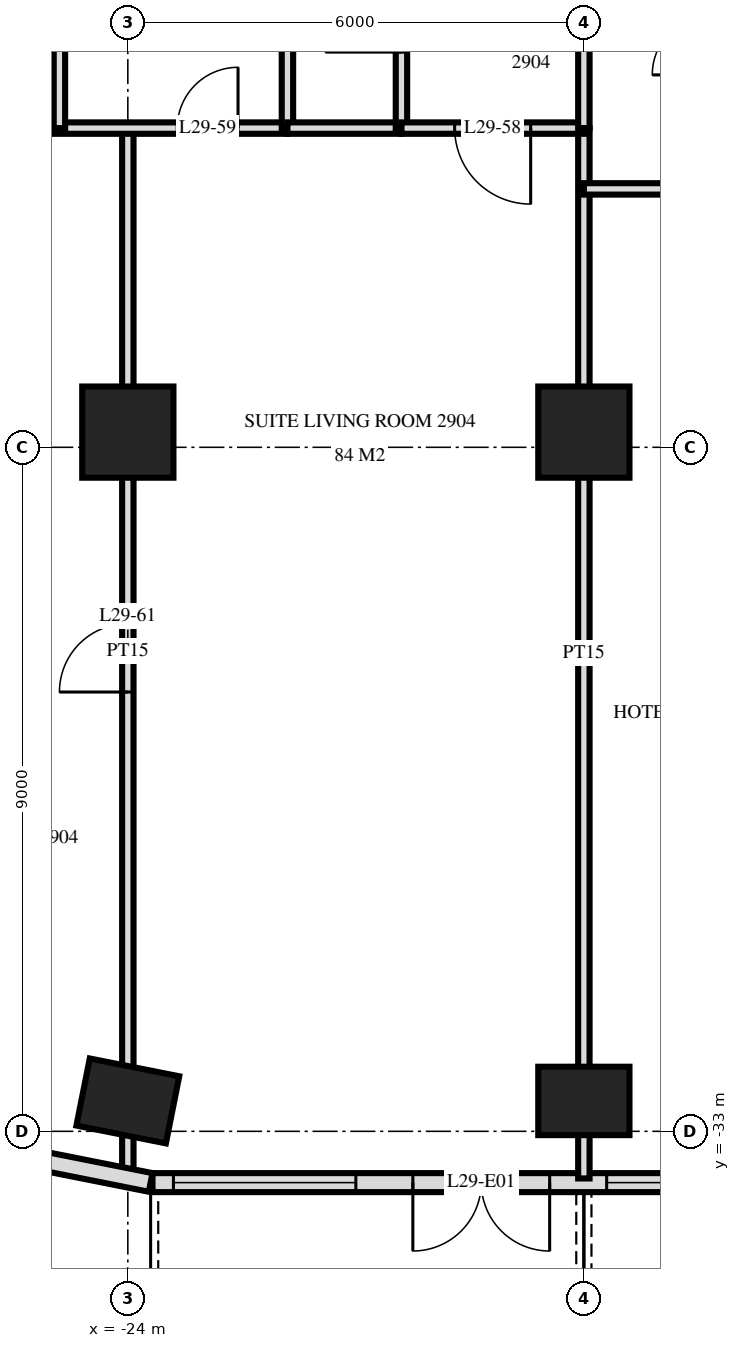
"""IFC4 building model, lengths in metres.
Left out: names, types, materials, properties, quantities, classifications, styles, units other than length and angle.
Written with IfcOpenShell. Run it as: python <this file> out.ifc"""

import sys

from ifc_helpers import new_model, si_unit, direction, frame, frame_2d, origin, origin_2d, place, context, subcontext, project, spatial, rectangle, extrude, element, fill, save


model = new_model("IFC4")
c1 = context("Model", 3, precision=1e-05, world=origin(), true_north=direction((0.0, 1.0)))
c2 = subcontext(c1, "Body", "Model", "MODEL_VIEW")
j1 = project(units=[si_unit("LENGTHUNIT", "METRE"), si_unit("PLANEANGLEUNIT", "RADIAN")], contexts=[c1])
p1 = place(None, origin())
s1 = spatial("IfcSite", under=j1, at=p1, CompositionType="ELEMENT")
p2 = place(p1, origin())
s2 = spatial("IfcBuilding", under=s1, at=p2, CompositionType="ELEMENT")
p3 = place(p2, frame((0.0, 0.0, 116.4)))
s3 = spatial("IfcBuildingStorey", under=s2, at=p3, CompositionType="ELEMENT", Elevation=116.4)
p4 = place(p3, frame((-24.0, -32.6, 0.0), z_axis=(0.0, 0.0, 1.0), x_axis=(-0.980792089743, 0.195056086032, 0.0)))
e1 = element("IfcColumn", 1, at=p4, inside=s3, PredefinedType="COLUMN", context=c2, shape_type="SweptSolid", body=[
    extrude(rectangle(XDim=1.2, YDim=0.9, at=origin_2d()), origin(), (0.0, 0.0, 1.0), 3.6),
])
p5 = place(p3, frame((-24.0, -23.8, 0.0), z_axis=(0.0, 0.0, 1.0), x_axis=(1.0, 0.0, 0.0)))
e2 = element("IfcColumn", 2, at=p5, inside=s3, PredefinedType="COLUMN", context=c2, shape_type="SweptSolid", body=[
    extrude(rectangle(XDim=1.2, YDim=1.2, at=origin_2d()), origin(), (0.0, 0.0, 1.0), 3.6),
])
p6 = place(p3, frame((-18.0, -32.6, 0.0), z_axis=(0.0, 0.0, 1.0), x_axis=(1.0, 0.0, 0.0)))
e3 = element("IfcColumn", 3, at=p6, inside=s3, PredefinedType="COLUMN", context=c2, shape_type="SweptSolid", body=[
    extrude(rectangle(XDim=1.2, YDim=0.9, at=origin_2d()), origin(), (0.0, 0.0, 1.0), 3.6),
])
p7 = place(p3, frame((-18.0, -23.8, 0.0), z_axis=(0.0, 0.0, 1.0), x_axis=(1.0, 0.0, 0.0)))
e4 = element("IfcColumn", 4, at=p7, inside=s3, PredefinedType="COLUMN", context=c2, shape_type="SweptSolid", body=[
    extrude(rectangle(XDim=1.2, YDim=1.2, at=origin_2d()), origin(), (0.0, 0.0, 1.0), 3.6),
])
p8 = place(p3, frame((-25.349, -33.344, 0.0), z_axis=(0.0, 0.0, 1.0), x_axis=(0.980775640221, -0.19513878023, 0.0)))
e5 = element("IfcWall", 5, at=p8, inside=s3, PredefinedType="SOLIDWALL", context=c2, shape_type="SweptSolid", body=[
    extrude(rectangle(XDim=1.681, YDim=0.25, at=frame_2d((0.841, 0.0))), origin(), (0.0, 0.0, 1.0), 3.32),
])
p9 = place(p3, frame((-23.675, -33.675, 0.0), z_axis=(0.0, 0.0, 1.0), x_axis=(1.0, 0.0, 0.0)))
e6 = element("IfcWall", 6, at=p9, inside=s3, PredefinedType="SOLIDWALL", context=c2, shape_type="SweptSolid", body=[
    extrude(rectangle(XDim=47.351, YDim=0.25, at=frame_2d((23.675, 0.0))), origin(), (0.0, 0.0, 1.0), 3.32),
])
p10 = place(p9, frame((0.275, 0.0, 0.3)))
e7 = element("IfcOpeningElement", 7, at=p10, cuts=e6, PredefinedType="OPENING", context=c2, shape_type="SweptSolid", body=[
    extrude(rectangle(XDim=2.4, YDim=2.1, at=frame_2d((1.2, 1.05))), frame((0.0, 0.135, 0.0), z_axis=(0.0, -1.0, 0.0), x_axis=(1.0, 0.0, 0.0)), (0.0, 0.0, 1.0), 0.27),
])
p11 = place(p9, frame((3.425, 0.0, 0.0)))
e8 = element("IfcOpeningElement", 8, at=p11, cuts=e6, PredefinedType="OPENING", context=c2, shape_type="SweptSolid", body=[
    extrude(rectangle(XDim=1.8, YDim=2.4, at=frame_2d((0.9, 1.2))), frame((0.0, 0.135, 0.0), z_axis=(0.0, -1.0, 0.0), x_axis=(1.0, 0.0, 0.0)), (0.0, 0.0, 1.0), 0.27),
])
p12 = place(p9, frame((5.975, 0.0, 0.3)))
e9 = element("IfcOpeningElement", 9, at=p12, cuts=e6, PredefinedType="OPENING", context=c2, shape_type="SweptSolid", body=[
    extrude(rectangle(XDim=2.4, YDim=2.1, at=frame_2d((1.2, 1.05))), frame((0.0, 0.135, 0.0), z_axis=(0.0, -1.0, 0.0), x_axis=(1.0, 0.0, 0.0)), (0.0, 0.0, 1.0), 0.27),
])
p13 = place(p9, frame((9.275, 0.0, 0.0)))
e10 = element("IfcOpeningElement", 10, at=p13, cuts=e6, PredefinedType="OPENING", context=c2, shape_type="SweptSolid", body=[
    extrude(rectangle(XDim=1.8, YDim=2.4, at=frame_2d((0.9, 1.2))), frame((0.0, 0.135, 0.0), z_axis=(0.0, -1.0, 0.0), x_axis=(1.0, 0.0, 0.0)), (0.0, 0.0, 1.0), 0.27),
])
p14 = place(p9, frame((12.275, 0.0, 0.0)))
e11 = element("IfcOpeningElement", 11, at=p14, cuts=e6, PredefinedType="OPENING", context=c2, shape_type="SweptSolid", body=[
    extrude(rectangle(XDim=1.8, YDim=2.4, at=frame_2d((0.9, 1.2))), frame((0.0, 0.135, 0.0), z_axis=(0.0, -1.0, 0.0), x_axis=(1.0, 0.0, 0.0)), (0.0, 0.0, 1.0), 0.27),
])
p15 = place(p9, frame((14.975, 0.0, 0.3)))
e12 = element("IfcOpeningElement", 12, at=p15, cuts=e6, PredefinedType="OPENING", context=c2, shape_type="SweptSolid", body=[
    extrude(rectangle(XDim=2.4, YDim=2.1, at=frame_2d((1.2, 1.05))), frame((0.0, 0.135, 0.0), z_axis=(0.0, -1.0, 0.0), x_axis=(1.0, 0.0, 0.0)), (0.0, 0.0, 1.0), 0.27),
])
p16 = place(p9, frame((17.975, 0.0, 0.3)))
e13 = element("IfcOpeningElement", 13, at=p16, cuts=e6, PredefinedType="OPENING", context=c2, shape_type="SweptSolid", body=[
    extrude(rectangle(XDim=2.4, YDim=2.1, at=frame_2d((1.2, 1.05))), frame((0.0, 0.135, 0.0), z_axis=(0.0, -1.0, 0.0), x_axis=(1.0, 0.0, 0.0)), (0.0, 0.0, 1.0), 0.27),
])
p17 = place(p9, frame((21.275, 0.0, 0.0)))
e14 = element("IfcOpeningElement", 14, at=p17, cuts=e6, PredefinedType="OPENING", context=c2, shape_type="SweptSolid", body=[
    extrude(rectangle(XDim=1.8, YDim=2.4, at=frame_2d((0.9, 1.2))), frame((0.0, 0.135, 0.0), z_axis=(0.0, -1.0, 0.0), x_axis=(1.0, 0.0, 0.0)), (0.0, 0.0, 1.0), 0.27),
])
p18 = place(p9, frame((24.275, 0.0, 0.0)))
e15 = element("IfcOpeningElement", 15, at=p18, cuts=e6, PredefinedType="OPENING", context=c2, shape_type="SweptSolid", body=[
    extrude(rectangle(XDim=1.8, YDim=2.4, at=frame_2d((0.9, 1.2))), frame((0.0, 0.135, 0.0), z_axis=(0.0, -1.0, 0.0), x_axis=(1.0, 0.0, 0.0)), (0.0, 0.0, 1.0), 0.27),
])
p19 = place(p9, frame((26.975, 0.0, 0.3)))
e16 = element("IfcOpeningElement", 16, at=p19, cuts=e6, PredefinedType="OPENING", context=c2, shape_type="SweptSolid", body=[
    extrude(rectangle(XDim=2.4, YDim=2.1, at=frame_2d((1.2, 1.05))), frame((0.0, 0.135, 0.0), z_axis=(0.0, -1.0, 0.0), x_axis=(1.0, 0.0, 0.0)), (0.0, 0.0, 1.0), 0.27),
])
p20 = place(p9, frame((30.275, 0.0, 0.0)))
e17 = element("IfcOpeningElement", 17, at=p20, cuts=e6, PredefinedType="OPENING", context=c2, shape_type="SweptSolid", body=[
    extrude(rectangle(XDim=1.8, YDim=2.4, at=frame_2d((0.9, 1.2))), frame((0.0, 0.135, 0.0), z_axis=(0.0, -1.0, 0.0), x_axis=(1.0, 0.0, 0.0)), (0.0, 0.0, 1.0), 0.27),
])
p21 = place(p9, frame((32.975, 0.0, 0.3)))
e18 = element("IfcOpeningElement", 18, at=p21, cuts=e6, PredefinedType="OPENING", context=c2, shape_type="SweptSolid", body=[
    extrude(rectangle(XDim=2.4, YDim=2.1, at=frame_2d((1.2, 1.05))), frame((0.0, 0.135, 0.0), z_axis=(0.0, -1.0, 0.0), x_axis=(1.0, 0.0, 0.0)), (0.0, 0.0, 1.0), 0.27),
])
p22 = place(p9, frame((35.975, 0.0, 0.3)))
e19 = element("IfcOpeningElement", 19, at=p22, cuts=e6, PredefinedType="OPENING", context=c2, shape_type="SweptSolid", body=[
    extrude(rectangle(XDim=2.4, YDim=2.1, at=frame_2d((1.2, 1.05))), frame((0.0, 0.135, 0.0), z_axis=(0.0, -1.0, 0.0), x_axis=(1.0, 0.0, 0.0)), (0.0, 0.0, 1.0), 0.27),
])
p23 = place(p9, frame((39.275, 0.0, 0.0)))
e20 = element("IfcOpeningElement", 20, at=p23, cuts=e6, PredefinedType="OPENING", context=c2, shape_type="SweptSolid", body=[
    extrude(rectangle(XDim=1.8, YDim=2.4, at=frame_2d((0.9, 1.2))), frame((0.0, 0.135, 0.0), z_axis=(0.0, -1.0, 0.0), x_axis=(1.0, 0.0, 0.0)), (0.0, 0.0, 1.0), 0.27),
])
p24 = place(p9, frame((41.975, 0.0, 0.3)))
e21 = element("IfcOpeningElement", 21, at=p24, cuts=e6, PredefinedType="OPENING", context=c2, shape_type="SweptSolid", body=[
    extrude(rectangle(XDim=2.4, YDim=2.1, at=frame_2d((1.2, 1.05))), frame((0.0, 0.135, 0.0), z_axis=(0.0, -1.0, 0.0), x_axis=(1.0, 0.0, 0.0)), (0.0, 0.0, 1.0), 0.27),
])
p25 = place(p9, frame((45.125, 0.0, 0.0)))
e22 = element("IfcOpeningElement", 22, at=p25, cuts=e6, PredefinedType="OPENING", context=c2, shape_type="SweptSolid", body=[
    extrude(rectangle(XDim=1.8, YDim=2.4, at=frame_2d((0.9, 1.2))), frame((0.0, 0.135, 0.0), z_axis=(0.0, -1.0, 0.0), x_axis=(1.0, 0.0, 0.0)), (0.0, 0.0, 1.0), 0.27),
])
p26 = place(p3, frame((-18.0, -19.8, 0.0), z_axis=(0.0, 0.0, 1.0), x_axis=(0.0, 1.0, 0.0)))
e23 = element("IfcWall", 23, at=p26, inside=s3, PredefinedType="PARTITIONING", context=c2, shape_type="SweptSolid", body=[
    extrude(rectangle(XDim=3.0, YDim=0.15, at=frame_2d((1.5, 0.0))), origin(), (0.0, 0.0, 1.0), 3.32),
])
p27 = place(p3, frame((-18.0, -33.62, 0.0), z_axis=(0.0, 0.0, 1.0), x_axis=(0.0, 1.0, 0.0)))
e24 = element("IfcWall", 24, at=p27, inside=s3, PredefinedType="PARTITIONING", context=c2, shape_type="SweptSolid", body=[
    extrude(rectangle(XDim=13.82, YDim=0.15, at=frame_2d((6.91, 0.0))), origin(), (0.0, 0.0, 1.0), 3.32),
])
p28 = place(p3, frame((-20.4, -19.8, 0.0), z_axis=(0.0, 0.0, 1.0), x_axis=(0.0, 1.0, 0.0)))
e25 = element("IfcWall", 25, at=p28, inside=s3, PredefinedType="PARTITIONING", context=c2, shape_type="SweptSolid", body=[
    extrude(rectangle(XDim=3.0, YDim=0.15, at=frame_2d((1.5, 0.0))), origin(), (0.0, 0.0, 1.0), 3.32),
])
p29 = place(p28, frame((1.0, 0.0, 0.0)))
e26 = element("IfcOpeningElement", 26, at=p29, cuts=e25, PredefinedType="OPENING", context=c2, shape_type="SweptSolid", body=[
    extrude(rectangle(XDim=1.0, YDim=2.1, at=frame_2d((0.5, 1.05))), frame((0.0, 0.085, 0.0), z_axis=(0.0, -1.0, 0.0), x_axis=(1.0, 0.0, 0.0)), (0.0, 0.0, 1.0), 0.17),
])
p30 = place(p3, frame((-21.9, -19.8, 0.0), z_axis=(0.0, 0.0, 1.0), x_axis=(0.0, 1.0, 0.0)))
e27 = element("IfcWall", 27, at=p30, inside=s3, PredefinedType="PLUMBINGWALL", context=c2, shape_type="SweptSolid", body=[
    extrude(rectangle(XDim=3.0, YDim=0.15, at=frame_2d((1.5, 0.0))), origin(), (0.0, 0.0, 1.0), 3.32),
])
p31 = place(p3, frame((-24.0, -33.557, 0.0), z_axis=(0.0, 0.0, 1.0), x_axis=(0.0, 1.0, 0.0)))
e28 = element("IfcWall", 28, at=p31, inside=s3, PredefinedType="PARTITIONING", context=c2, shape_type="SweptSolid", body=[
    extrude(rectangle(XDim=13.757, YDim=0.15, at=frame_2d((6.878, 0.0))), origin(), (0.0, 0.0, 1.0), 3.32),
])
p32 = place(p31, frame((6.337, 0.0, 0.0)))
e29 = element("IfcOpeningElement", 29, at=p32, cuts=e28, PredefinedType="OPENING", context=c2, shape_type="SweptSolid", body=[
    extrude(rectangle(XDim=0.9, YDim=2.1, at=frame_2d((0.45, 1.05))), frame((0.0, 0.085, 0.0), z_axis=(0.0, -1.0, 0.0), x_axis=(1.0, 0.0, 0.0)), (0.0, 0.0, 1.0), 0.17),
])
p33 = place(p3, frame((-24.9, -19.8, 0.0), z_axis=(0.0, 0.0, 1.0), x_axis=(0.0, 1.0, 0.0)))
e30 = element("IfcWall", 30, at=p33, inside=s3, PredefinedType="PARTITIONING", context=c2, shape_type="SweptSolid", body=[
    extrude(rectangle(XDim=3.0, YDim=0.15, at=frame_2d((1.5, 0.0))), origin(), (0.0, 0.0, 1.0), 3.32),
])
p34 = place(p3, frame((-18.0, -20.6, 0.0), z_axis=(0.0, 0.0, 1.0), x_axis=(1.0, 0.0, 0.0)))
e31 = element("IfcWall", 31, at=p34, inside=s3, PredefinedType="PARTITIONING", context=c2, shape_type="SweptSolid", body=[
    extrude(rectangle(XDim=1.7, YDim=0.15, at=frame_2d((0.85, 0.0))), origin(), (0.0, 0.0, 1.0), 3.32),
])
p35 = place(p3, frame((-20.4, -19.8, 0.0), z_axis=(0.0, 0.0, 1.0), x_axis=(1.0, 0.0, 0.0)))
e32 = element("IfcWall", 32, at=p35, inside=s3, PredefinedType="PARTITIONING", context=c2, shape_type="SweptSolid", body=[
    extrude(rectangle(XDim=2.4, YDim=0.15, at=frame_2d((1.2, 0.0))), origin(), (0.0, 0.0, 1.0), 3.32),
])
p36 = place(p35, frame((0.7, 0.0, 0.0)))
e33 = element("IfcOpeningElement", 33, at=p36, cuts=e32, PredefinedType="OPENING", context=c2, shape_type="SweptSolid", body=[
    extrude(rectangle(XDim=1.0, YDim=2.1, at=frame_2d((0.5, 1.05))), frame((0.0, 0.085, 0.0), z_axis=(0.0, -1.0, 0.0), x_axis=(1.0, 0.0, 0.0)), (0.0, 0.0, 1.0), 0.17),
])
p37 = place(p3, frame((-28.02, -19.8, 0.0), z_axis=(0.0, 0.0, 1.0), x_axis=(1.0, 0.0, 0.0)))
e34 = element("IfcWall", 34, at=p37, inside=s3, PredefinedType="PARTITIONING", context=c2, shape_type="SweptSolid", body=[
    extrude(rectangle(XDim=6.12, YDim=0.15, at=frame_2d((3.06, 0.0))), origin(), (0.0, 0.0, 1.0), 3.32),
])
p38 = place(p37, frame((4.67, 0.0, 0.0)))
e35 = element("IfcOpeningElement", 35, at=p38, cuts=e34, PredefinedType="OPENING", context=c2, shape_type="SweptSolid", body=[
    extrude(rectangle(XDim=0.8, YDim=2.1, at=frame_2d((0.4, 1.05))), frame((0.0, 0.085, 0.0), z_axis=(0.0, -1.0, 0.0), x_axis=(1.0, 0.0, 0.0)), (0.0, 0.0, 1.0), 0.17),
])
p39 = place(p37, frame((1.02, 0.0, 0.0)))
e36 = element("IfcOpeningElement", 36, at=p39, cuts=e34, PredefinedType="OPENING", context=c2, shape_type="SweptSolid", body=[
    extrude(rectangle(XDim=0.9, YDim=2.1, at=frame_2d((0.45, 1.05))), frame((0.0, 0.085, 0.0), z_axis=(0.0, -1.0, 0.0), x_axis=(1.0, 0.0, 0.0)), (0.0, 0.0, 1.0), 0.17),
])
p40 = place(p3, frame((-21.9, -19.8, 0.0), z_axis=(0.0, 0.0, 1.0), x_axis=(1.0, 0.0, 0.0)))
e37 = element("IfcWall", 37, at=p40, inside=s3, PredefinedType="PLUMBINGWALL", context=c2, shape_type="SweptSolid", body=[
    extrude(rectangle(XDim=1.5, YDim=0.15, at=frame_2d((0.75, 0.0))), origin(), (0.0, 0.0, 1.0), 3.32),
])
p41 = place(p10, origin())
e38 = element("IfcWindow", 38, at=p41, inside=s3, PartitioningType="SINGLE_PANEL", PredefinedType="WINDOW", context=c2, shape_type="SweptSolid", body=[
    extrude(rectangle(XDim=2.4, YDim=2.1, at=frame_2d((1.2, 1.05))), frame((0.0, 0.03, 0.0), z_axis=(0.0, -1.0, 0.0), x_axis=(1.0, 0.0, 0.0)), (0.0, 0.0, 1.0), 0.06),
])
fill(e7, e38)
p42 = place(p11, frame((0.9, 0.0, 0.0), z_axis=(0.0, 0.0, 1.0), x_axis=(-1.0, 0.0, 0.0)))
e39 = element("IfcDoor", 39, at=p42, inside=s3, OperationType="DOUBLE_DOOR_SINGLE_SWING", PredefinedType="DOOR", context=c2, shape_type="SweptSolid", body=[
    extrude(rectangle(XDim=1.8, YDim=2.4, at=frame_2d((0.0, 1.2))), frame((0.0, -0.025, 0.0), z_axis=(0.0, 1.0, 0.0), x_axis=(-1.0, 0.0, 0.0)), (0.0, 0.0, 1.0), 0.05),
])
fill(e8, e39)
p43 = place(p12, origin())
e40 = element("IfcWindow", 40, at=p43, inside=s3, PartitioningType="SINGLE_PANEL", PredefinedType="WINDOW", context=c2, shape_type="SweptSolid", body=[
    extrude(rectangle(XDim=2.4, YDim=2.1, at=frame_2d((1.2, 1.05))), frame((0.0, 0.03, 0.0), z_axis=(0.0, -1.0, 0.0), x_axis=(1.0, 0.0, 0.0)), (0.0, 0.0, 1.0), 0.06),
])
fill(e9, e40)
p44 = place(p36, frame((0.5, 0.0, 0.0), z_axis=(0.0, 0.0, 1.0), x_axis=(-1.0, 0.0, 0.0)))
e41 = element("IfcDoor", 41, at=p44, inside=s3, OperationType="SINGLE_SWING_RIGHT", PredefinedType="DOOR", context=c2, shape_type="SweptSolid", body=[
    extrude(rectangle(XDim=1.0, YDim=2.1, at=frame_2d((0.0, 1.05))), frame((0.0, -0.025, 0.0), z_axis=(0.0, 1.0, 0.0), x_axis=(-1.0, 0.0, 0.0)), (0.0, 0.0, 1.0), 0.05),
])
fill(e33, e41)
p45 = place(p38, origin())
e42 = element("IfcDoor", 42, at=p45, inside=s3, OperationType="SINGLE_SWING_LEFT", PredefinedType="DOOR", context=c2, shape_type="SweptSolid", body=[
    extrude(rectangle(XDim=0.8, YDim=2.1, at=frame_2d((0.4, 1.05))), frame((0.0, 0.025, 0.0), z_axis=(0.0, -1.0, 0.0), x_axis=(1.0, 0.0, 0.0)), (0.0, 0.0, 1.0), 0.05),
])
fill(e35, e42)
p46 = place(p32, origin())
e43 = element("IfcDoor", 43, at=p46, inside=s3, OperationType="SINGLE_SWING_RIGHT", PredefinedType="DOOR", context=c2, shape_type="SweptSolid", body=[
    extrude(rectangle(XDim=0.9, YDim=2.1, at=frame_2d((0.45, 1.05))), frame((0.0, 0.025, 0.0), z_axis=(0.0, -1.0, 0.0), x_axis=(1.0, 0.0, 0.0)), (0.0, 0.0, 1.0), 0.05),
])
fill(e29, e43)
save(model, sys.argv[1])
